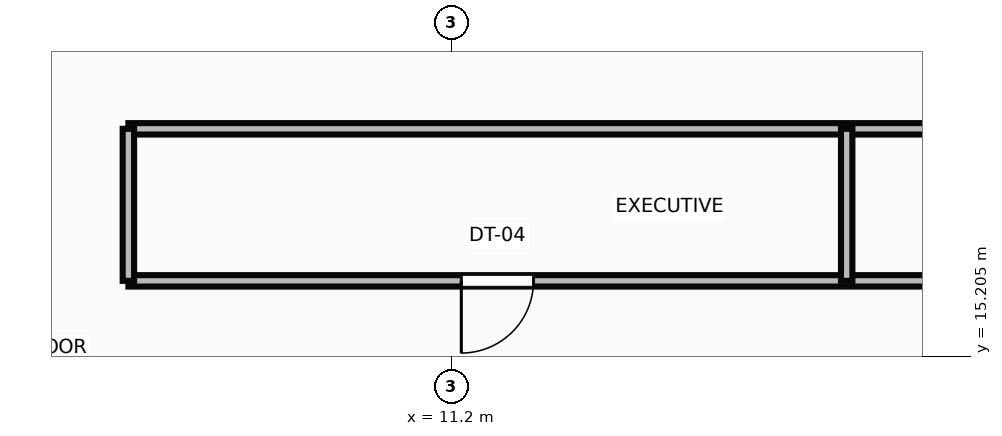
"""IFC4 building model, lengths in metres.
Left out: names, types, materials, properties, quantities, classifications, styles, units other than length and angle.
Written with IfcOpenShell. Run it as: python <this file> out.ifc"""

import sys

from ifc_helpers import new_model, si_unit, direction, frame, frame_2d, origin, place, context, subcontext, project, spatial, rectangle, extrude, source, transform, mapped, element, fill, save


model = new_model("IFC4")
c1 = context("Model", 3, precision=1e-05, world=origin(), true_north=direction((0.0, 1.0)))
c2 = subcontext(c1, "Body", "Model", "MODEL_VIEW")
j1 = project(units=[si_unit("LENGTHUNIT", "METRE"), si_unit("PLANEANGLEUNIT", "RADIAN")], contexts=[c1])
p1 = place(None, origin())
s1 = spatial("IfcSite", under=j1, at=p1, CompositionType="ELEMENT")
p2 = place(p1, origin())
s2 = spatial("IfcBuilding", under=s1, at=p2, CompositionType="ELEMENT")
p3 = place(p2, frame((0.0, 0.0, 262.45)))
s3 = spatial("IfcBuildingStorey", under=s2, at=p3, CompositionType="ELEMENT", Elevation=262.45)
m1 = source(origin(), c2, "Body", "SweptSolid", [
    extrude(rectangle(XDim=23.25, YDim=0.15, at=frame_2d((11.625, 0.0))), origin(), (0.0, 0.0, 1.0), 3.4),
])
p4 = place(p3, frame((6.95, 16.2, 0.0), z_axis=(0.0, 0.0, 1.0), x_axis=(1.0, 0.0, 0.0)))
e1 = element("IfcWall", 1, at=p4, inside=s3, PredefinedType="PARTITIONING", context=c2, shape_type="MappedRepresentation", body=[
    mapped(m1, transform((0.0, 0.0, 0.0))),
])
p5 = place(p4, frame((4.38, 0.0, 0.0)))
e2 = element("IfcOpeningElement", 2, at=p5, cuts=e1, PredefinedType="OPENING", context=c2, shape_type="SweptSolid", body=[
    extrude(rectangle(XDim=0.95, YDim=2.15, at=frame_2d((0.475, 1.075))), frame((0.0, 0.085, 0.0), z_axis=(0.0, -1.0, 0.0), x_axis=(1.0, 0.0, 0.0)), (0.0, 0.0, 1.0), 0.17),
])
p6 = place(p4, frame((15.745, 0.0, 0.0)))
e3 = element("IfcOpeningElement", 3, at=p6, cuts=e1, PredefinedType="OPENING", context=c2, shape_type="SweptSolid", body=[
    extrude(rectangle(XDim=0.95, YDim=2.15, at=frame_2d((0.475, 1.075))), frame((0.0, 0.085, 0.0), z_axis=(0.0, -1.0, 0.0), x_axis=(1.0, 0.0, 0.0)), (0.0, 0.0, 1.0), 0.17),
])
p7 = place(p3, frame((30.2, 18.2, 0.0), z_axis=(0.0, 0.0, 1.0), x_axis=(-1.0, 0.0, 0.0)))
e4 = element("IfcWall", 4, at=p7, inside=s3, PredefinedType="PARTITIONING", context=c2, shape_type="MappedRepresentation", body=[
    mapped(m1, transform((0.0, 0.0, 0.0))),
])
m2 = source(origin(), c2, "Body", "SweptSolid", [
    extrude(rectangle(XDim=2.0, YDim=0.15, at=frame_2d((1.0, 0.0))), origin(), (0.0, 0.0, 1.0), 3.4),
])
for number, where, z_axis, x_axis in (
    (5, (6.95, 18.2, 0.0), (0.0, 0.0, 1.0), (0.0, -1.0, 0.0)),
    (6, (16.4, 18.2, 0.0), (0.0, 0.0, 1.0), (0.0, -1.0, 0.0)),
):
    element("IfcWall", number, at=place(p3, frame(where, z_axis=z_axis, x_axis=x_axis)), inside=s3, PredefinedType="PARTITIONING", context=c2, shape_type="MappedRepresentation", body=[
        mapped(m2, transform((0.0, 0.0, 0.0))),
    ])
m3 = source(origin(), c2, "Body", "SweptSolid", [
    extrude(rectangle(XDim=0.95, YDim=2.15, at=frame_2d((0.475, 1.075))), frame((0.0, 0.025, 0.0), z_axis=(0.0, -1.0, 0.0), x_axis=(1.0, 0.0, 0.0)), (0.0, 0.0, 1.0), 0.05),
])
p8 = place(p5, origin())
e7 = element("IfcDoor", 7, at=p8, inside=s3, OperationType="SINGLE_SWING_LEFT", PredefinedType="DOOR", context=c2, shape_type="MappedRepresentation", body=[
    mapped(m3, transform((0.0, 0.0, 0.0))),
])
fill(e2, e7)
save(model, sys.argv[1])
